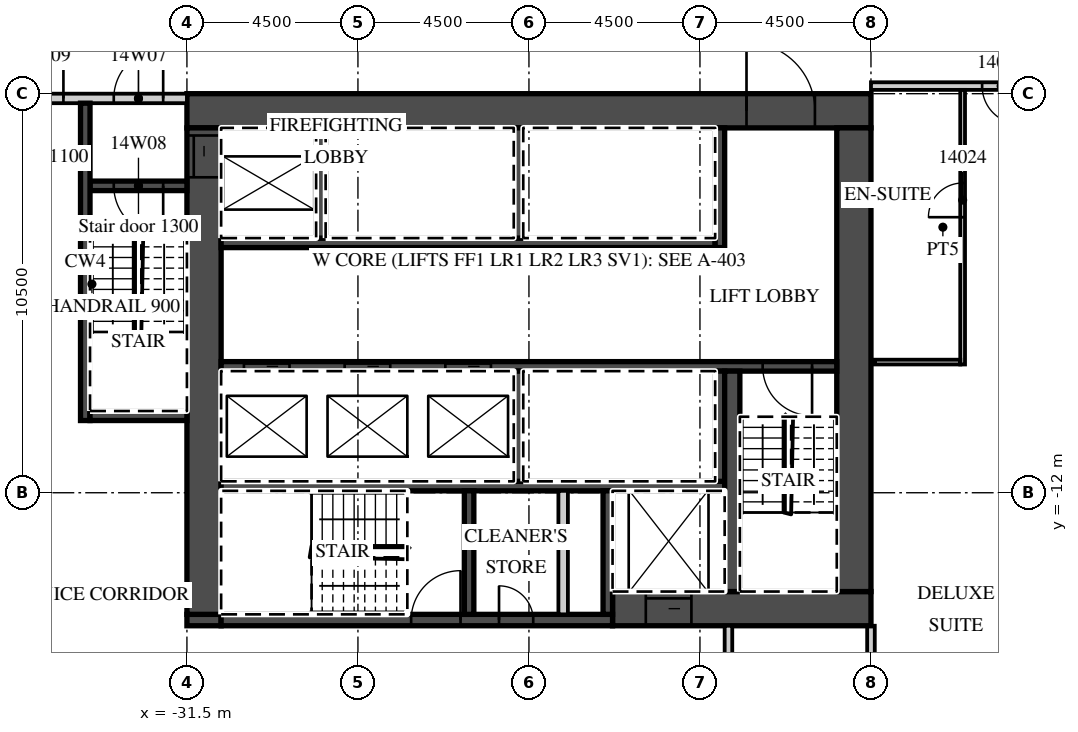
"""IFC4 building model, lengths in metres.
Left out: names, types, materials, properties, quantities, classifications, styles, units other than length and angle.
Written with IfcOpenShell. Run it as: python <this file> out.ifc"""

import sys

from ifc_helpers import new_model, si_unit, direction, frame, frame_2d, origin, place, context, subcontext, project, spatial, rectangle, extrude, element, fill, save


model = new_model("IFC4")
c1 = context("Model", 3, precision=1e-05, world=origin(), true_north=direction((0.0, 1.0)))
c2 = subcontext(c1, "Body", "Model", "MODEL_VIEW")
j1 = project(units=[si_unit("LENGTHUNIT", "METRE"), si_unit("PLANEANGLEUNIT", "RADIAN")], contexts=[c1])
p1 = place(None, origin())
s1 = spatial("IfcSite", under=j1, at=p1, CompositionType="ELEMENT")
p2 = place(p1, origin())
s2 = spatial("IfcBuilding", under=s1, at=p2, CompositionType="ELEMENT")
p3 = place(p2, frame((0.0, 0.0, 76.5)))
s3 = spatial("IfcBuildingStorey", under=s2, at=p3, CompositionType="ELEMENT", Elevation=76.5)
p4 = place(p3, frame((-13.5, -21.55, 0.0), z_axis=(0.0, 0.0, 1.0), x_axis=(0.0, 1.0, 0.0)))
e1 = element("IfcWall", 1, at=p4, inside=s3, PredefinedType="PARTITIONING", context=c2, shape_type="SweptSolid", body=[
    extrude(rectangle(XDim=6.05, YDim=0.2, at=frame_2d((3.025, 0.0))), origin(), (0.0, 0.0, 1.0), 3.02),
])
p5 = place(p3, frame((-13.5, -1.3, 0.0), z_axis=(0.0, 0.0, 1.0), x_axis=(1.0, 0.0, 0.0)))
e2 = element("IfcWall", 2, at=p5, inside=s3, PredefinedType="PARTITIONING", context=c2, shape_type="SweptSolid", body=[
    extrude(rectangle(XDim=58.05, YDim=0.2, at=frame_2d((29.025, 0.0))), origin(), (0.0, 0.0, 1.0), 3.02),
])
p6 = place(p5, frame((2.925, 0.0, 0.0)))
e3 = element("IfcOpeningElement", 3, at=p6, cuts=e2, PredefinedType="OPENING", context=c2, shape_type="SweptSolid", body=[
    extrude(rectangle(XDim=1.0, YDim=2.1, at=frame_2d((0.5, 1.05))), frame((0.0, 0.11, 0.0), z_axis=(0.0, -1.0, 0.0), x_axis=(1.0, 0.0, 0.0)), (0.0, 0.0, 1.0), 0.22),
])
p7 = place(p5, frame((5.075, 0.0, 0.0)))
e4 = element("IfcOpeningElement", 4, at=p7, cuts=e2, PredefinedType="OPENING", context=c2, shape_type="SweptSolid", body=[
    extrude(rectangle(XDim=1.0, YDim=2.1, at=frame_2d((0.5, 1.05))), frame((0.0, 0.11, 0.0), z_axis=(0.0, -1.0, 0.0), x_axis=(1.0, 0.0, 0.0)), (0.0, 0.0, 1.0), 0.22),
])
p8 = place(p5, frame((9.55, 0.0, 0.0)))
e5 = element("IfcOpeningElement", 5, at=p8, cuts=e2, PredefinedType="OPENING", context=c2, shape_type="SweptSolid", body=[
    extrude(rectangle(XDim=1.0, YDim=2.1, at=frame_2d((0.5, 1.05))), frame((0.0, 0.11, 0.0), z_axis=(0.0, -1.0, 0.0), x_axis=(1.0, 0.0, 0.0)), (0.0, 0.0, 1.0), 0.22),
])
p9 = place(p5, frame((18.862, 0.0, 0.0)))
e6 = element("IfcOpeningElement", 6, at=p9, cuts=e2, PredefinedType="OPENING", context=c2, shape_type="SweptSolid", body=[
    extrude(rectangle(XDim=1.2, YDim=2.1, at=frame_2d((0.6, 1.05))), frame((0.0, 0.11, 0.0), z_axis=(0.0, -1.0, 0.0), x_axis=(1.0, 0.0, 0.0)), (0.0, 0.0, 1.0), 0.22),
])
p10 = place(p5, frame((27.862, 0.0, 0.0)))
e7 = element("IfcOpeningElement", 7, at=p10, cuts=e2, PredefinedType="OPENING", context=c2, shape_type="SweptSolid", body=[
    extrude(rectangle(XDim=1.2, YDim=2.1, at=frame_2d((0.6, 1.05))), frame((0.0, 0.11, 0.0), z_axis=(0.0, -1.0, 0.0), x_axis=(1.0, 0.0, 0.0)), (0.0, 0.0, 1.0), 0.22),
])
p11 = place(p5, frame((34.45, 0.0, 0.0)))
e8 = element("IfcOpeningElement", 8, at=p11, cuts=e2, PredefinedType="OPENING", context=c2, shape_type="SweptSolid", body=[
    extrude(rectangle(XDim=1.0, YDim=2.1, at=frame_2d((0.5, 1.05))), frame((0.0, 0.11, 0.0), z_axis=(0.0, -1.0, 0.0), x_axis=(1.0, 0.0, 0.0)), (0.0, 0.0, 1.0), 0.22),
])
p12 = place(p5, frame((38.925, 0.0, 0.0)))
e9 = element("IfcOpeningElement", 9, at=p12, cuts=e2, PredefinedType="OPENING", context=c2, shape_type="SweptSolid", body=[
    extrude(rectangle(XDim=1.0, YDim=2.1, at=frame_2d((0.5, 1.05))), frame((0.0, 0.11, 0.0), z_axis=(0.0, -1.0, 0.0), x_axis=(1.0, 0.0, 0.0)), (0.0, 0.0, 1.0), 0.22),
])
p13 = place(p5, frame((45.862, 0.0, 0.0)))
e10 = element("IfcOpeningElement", 10, at=p13, cuts=e2, PredefinedType="OPENING", context=c2, shape_type="SweptSolid", body=[
    extrude(rectangle(XDim=1.2, YDim=2.1, at=frame_2d((0.6, 1.05))), frame((0.0, 0.11, 0.0), z_axis=(0.0, -1.0, 0.0), x_axis=(1.0, 0.0, 0.0)), (0.0, 0.0, 1.0), 0.22),
])
p14 = place(p5, frame((50.075, 0.0, 0.0)))
e11 = element("IfcOpeningElement", 11, at=p14, cuts=e2, PredefinedType="OPENING", context=c2, shape_type="SweptSolid", body=[
    extrude(rectangle(XDim=1.0, YDim=2.1, at=frame_2d((0.5, 1.05))), frame((0.0, 0.11, 0.0), z_axis=(0.0, -1.0, 0.0), x_axis=(1.0, 0.0, 0.0)), (0.0, 0.0, 1.0), 0.22),
])
p15 = place(p5, frame((56.525, 0.0, 0.0)))
e12 = element("IfcOpeningElement", 12, at=p15, cuts=e2, PredefinedType="OPENING", context=c2, shape_type="SweptSolid", body=[
    extrude(rectangle(XDim=1.0, YDim=2.1, at=frame_2d((0.5, 1.05))), frame((0.0, 0.11, 0.0), z_axis=(0.0, -1.0, 0.0), x_axis=(1.0, 0.0, 0.0)), (0.0, 0.0, 1.0), 0.22),
])
p16 = place(p3, frame((-11.088, -8.625, 0.0), z_axis=(0.0, 0.0, 1.0), x_axis=(0.0, 1.0, 0.0)))
e13 = element("IfcWall", 13, at=p16, inside=s3, PredefinedType="PARTITIONING", context=c2, shape_type="SweptSolid", body=[
    extrude(rectangle(XDim=7.225, YDim=0.125, at=frame_2d((3.613, 0.0))), origin(), (0.0, 0.0, 1.0), 3.02),
])
p17 = place(p16, frame((3.875, 0.0, 0.0)))
e14 = element("IfcOpeningElement", 14, at=p17, cuts=e13, PredefinedType="OPENING", context=c2, shape_type="SweptSolid", body=[
    extrude(rectangle(XDim=0.9, YDim=2.1, at=frame_2d((0.45, 1.05))), frame((0.0, 0.073, 0.0), z_axis=(0.0, -1.0, 0.0), x_axis=(1.0, 0.0, 0.0)), (0.0, 0.0, 1.0), 0.145),
])
p18 = place(p3, frame((-13.4, -8.562, 0.0), z_axis=(0.0, 0.0, 1.0), x_axis=(1.0, 0.0, 0.0)))
e15 = element("IfcWall", 15, at=p18, inside=s3, PredefinedType="PARTITIONING", context=c2, shape_type="SweptSolid", body=[
    extrude(rectangle(XDim=2.25, YDim=0.125, at=frame_2d((1.125, 0.0))), origin(), (0.0, 0.0, 1.0), 3.02),
])
p19 = place(p3, frame((-31.5, -1.95, 0.0), z_axis=(0.0, 0.0, 1.0), x_axis=(1.0, 0.0, 0.0)))
e16 = element("IfcWall", 16, at=p19, inside=s3, PredefinedType="SHEAR", context=c2, shape_type="SweptSolid", body=[
    extrude(rectangle(XDim=18.0, YDim=0.9, at=frame_2d((9.0, 0.0))), origin(), (0.0, 0.0, 1.0), 3.02),
])
p20 = place(p19, frame((14.725, 0.0, 0.0)))
e17 = element("IfcOpeningElement", 17, at=p20, cuts=e16, PredefinedType="OPENING", context=c2, shape_type="SweptSolid", body=[
    extrude(rectangle(XDim=1.8, YDim=2.1, at=frame_2d((0.9, 1.05))), frame((0.0, 0.46, 0.0), z_axis=(0.0, -1.0, 0.0), x_axis=(1.0, 0.0, 0.0)), (0.0, 0.0, 1.0), 0.92),
])
p21 = place(p3, frame((-20.3, -15.05, 0.0), z_axis=(0.0, 0.0, 1.0), x_axis=(1.0, 0.0, 0.0)))
e18 = element("IfcWall", 18, at=p21, inside=s3, PredefinedType="SHEAR", context=c2, shape_type="SweptSolid", body=[
    extrude(rectangle(XDim=6.8, YDim=0.9, at=frame_2d((3.4, 0.0))), origin(), (0.0, 0.0, 1.0), 3.02),
])
p22 = place(p21, frame((0.875, 0.0, 0.0)))
e19 = element("IfcOpeningElement", 19, at=p22, cuts=e18, PredefinedType="OPENING", context=c2, shape_type="SweptSolid", body=[
    extrude(rectangle(XDim=1.2, YDim=2.1, at=frame_2d((0.6, 1.05))), frame((0.0, 0.46, 0.0), z_axis=(0.0, -1.0, 0.0), x_axis=(1.0, 0.0, 0.0)), (0.0, 0.0, 1.0), 0.92),
])
p23 = place(p3, frame((-31.5, -15.35, 0.0), z_axis=(0.0, 0.0, 1.0), x_axis=(1.0, 0.0, 0.0)))
e20 = element("IfcWall", 20, at=p23, inside=s3, PredefinedType="SHEAR", context=c2, shape_type="SweptSolid", body=[
    extrude(rectangle(XDim=0.9, YDim=0.3, at=frame_2d((0.45, 0.0))), origin(), (0.0, 0.0, 1.0), 3.02),
])
p24 = place(p3, frame((-30.6, -15.35, 0.0), z_axis=(0.0, 0.0, 1.0), x_axis=(1.0, 0.0, 0.0)))
e21 = element("IfcWall", 21, at=p24, inside=s3, PredefinedType="SHEAR", context=c2, shape_type="SweptSolid", body=[
    extrude(rectangle(XDim=10.3, YDim=0.3, at=frame_2d((5.15, 0.0))), origin(), (0.0, 0.0, 1.0), 3.02),
])
p25 = place(p24, frame((5.0, 0.0, 0.0)))
e22 = element("IfcOpeningElement", 22, at=p25, cuts=e21, PredefinedType="OPENING", context=c2, shape_type="SweptSolid", body=[
    extrude(rectangle(XDim=1.3, YDim=2.1, at=frame_2d((0.65, 1.05))), frame((0.0, 0.16, 0.0), z_axis=(0.0, -1.0, 0.0), x_axis=(1.0, 0.0, 0.0)), (0.0, 0.0, 1.0), 0.32),
])
p26 = place(p24, frame((7.312, 0.0, 0.0)))
e23 = element("IfcOpeningElement", 23, at=p26, cuts=e21, PredefinedType="OPENING", context=c2, shape_type="SweptSolid", body=[
    extrude(rectangle(XDim=0.9, YDim=2.1, at=frame_2d((0.45, 1.05))), frame((0.0, 0.16, 0.0), z_axis=(0.0, -1.0, 0.0), x_axis=(1.0, 0.0, 0.0)), (0.0, 0.0, 1.0), 0.32),
])
p27 = place(p3, frame((-31.05, -15.2, 0.0), z_axis=(0.0, 0.0, 1.0), x_axis=(0.0, 1.0, 0.0)))
e24 = element("IfcWall", 24, at=p27, inside=s3, PredefinedType="SHEAR", context=c2, shape_type="SweptSolid", body=[
    extrude(rectangle(XDim=12.8, YDim=0.9, at=frame_2d((6.4, 0.0))), origin(), (0.0, 0.0, 1.0), 3.02),
])
p28 = place(p27, frame((11.5, 0.0, 0.0)))
e25 = element("IfcOpeningElement", 25, at=p28, cuts=e24, PredefinedType="OPENING", context=c2, shape_type="SweptSolid", body=[
    extrude(rectangle(XDim=1.1, YDim=2.1, at=frame_2d((0.55, 1.05))), frame((0.0, 0.46, 0.0), z_axis=(0.0, -1.0, 0.0), x_axis=(1.0, 0.0, 0.0)), (0.0, 0.0, 1.0), 0.92),
])
p29 = place(p3, frame((-13.95, -14.6, 0.0), z_axis=(0.0, 0.0, 1.0), x_axis=(0.0, 1.0, 0.0)))
e26 = element("IfcWall", 26, at=p29, inside=s3, PredefinedType="SHEAR", context=c2, shape_type="SweptSolid", body=[
    extrude(rectangle(XDim=12.2, YDim=0.9, at=frame_2d((6.1, 0.0))), origin(), (0.0, 0.0, 1.0), 3.02),
])
p30 = place(p3, frame((-30.6, -5.425, 0.0), z_axis=(0.0, 0.0, 1.0), x_axis=(1.0, 0.0, 0.0)))
e27 = element("IfcWall", 27, at=p30, inside=s3, PredefinedType="SHEAR", context=c2, shape_type="SweptSolid", body=[
    extrude(rectangle(XDim=13.0, YDim=0.25, at=frame_2d((6.5, 0.0))), origin(), (0.0, 0.0, 1.0), 3.02),
])
p31 = place(p3, frame((-17.475, -5.55, 0.0), z_axis=(0.0, 0.0, 1.0), x_axis=(0.0, 1.0, 0.0)))
e28 = element("IfcWall", 28, at=p31, inside=s3, PredefinedType="SHEAR", context=c2, shape_type="SweptSolid", body=[
    extrude(rectangle(XDim=3.15, YDim=0.25, at=frame_2d((1.575, 0.0))), origin(), (0.0, 0.0, 1.0), 3.02),
])
for number, where, z_axis, x_axis in (
    (29, (-27.975, -5.3, 0.0), (0.0, 0.0, 1.0), (0.0, 1.0, 0.0)),
    (30, (-22.775, -5.3, 0.0), (0.0, 0.0, 1.0), (0.0, 1.0, 0.0)),
):
    element("IfcWall", number, at=place(p3, frame(where, z_axis=z_axis, x_axis=x_axis)), inside=s3, PredefinedType="SHEAR", context=c2, shape_type="SweptSolid", body=[
        extrude(rectangle(XDim=2.9, YDim=0.25, at=frame_2d((1.45, 0.0))), origin(), (0.0, 0.0, 1.0), 3.02),
    ])
p32 = place(p3, frame((-30.6, -8.675, 0.0), z_axis=(0.0, 0.0, 1.0), x_axis=(1.0, 0.0, 0.0)))
e31 = element("IfcWall", 31, at=p32, inside=s3, PredefinedType="SHEAR", context=c2, shape_type="SweptSolid", body=[
    extrude(rectangle(XDim=16.2, YDim=0.25, at=frame_2d((8.1, 0.0))), origin(), (0.0, 0.0, 1.0), 3.02),
])
p33 = place(p32, frame((0.6, 0.0, 0.0)))
e32 = element("IfcOpeningElement", 32, at=p33, cuts=e31, PredefinedType="OPENING", context=c2, shape_type="SweptSolid", body=[
    extrude(rectangle(XDim=1.2, YDim=2.1, at=frame_2d((0.6, 1.05))), frame((0.0, 0.135, 0.0), z_axis=(0.0, -1.0, 0.0), x_axis=(1.0, 0.0, 0.0)), (0.0, 0.0, 1.0), 0.27),
])
p34 = place(p32, frame((3.25, 0.0, 0.0)))
e33 = element("IfcOpeningElement", 33, at=p34, cuts=e31, PredefinedType="OPENING", context=c2, shape_type="SweptSolid", body=[
    extrude(rectangle(XDim=1.2, YDim=2.1, at=frame_2d((0.6, 1.05))), frame((0.0, 0.135, 0.0), z_axis=(0.0, -1.0, 0.0), x_axis=(1.0, 0.0, 0.0)), (0.0, 0.0, 1.0), 0.27),
])
p35 = place(p32, frame((5.9, 0.0, 0.0)))
e34 = element("IfcOpeningElement", 34, at=p35, cuts=e31, PredefinedType="OPENING", context=c2, shape_type="SweptSolid", body=[
    extrude(rectangle(XDim=1.2, YDim=2.1, at=frame_2d((0.6, 1.05))), frame((0.0, 0.135, 0.0), z_axis=(0.0, -1.0, 0.0), x_axis=(1.0, 0.0, 0.0)), (0.0, 0.0, 1.0), 0.27),
])
p36 = place(p32, frame((14.25, 0.0, 0.0)))
e35 = element("IfcOpeningElement", 35, at=p36, cuts=e31, PredefinedType="OPENING", context=c2, shape_type="SweptSolid", body=[
    extrude(rectangle(XDim=1.3, YDim=2.1, at=frame_2d((0.65, 1.05))), frame((0.0, 0.135, 0.0), z_axis=(0.0, -1.0, 0.0), x_axis=(1.0, 0.0, 0.0)), (0.0, 0.0, 1.0), 0.27),
])
p37 = place(p3, frame((-30.6, -11.825, 0.0), z_axis=(0.0, 0.0, 1.0), x_axis=(1.0, 0.0, 0.0)))
e36 = element("IfcWall", 36, at=p37, inside=s3, PredefinedType="SHEAR", context=c2, shape_type="SweptSolid", body=[
    extrude(rectangle(XDim=13.25, YDim=0.25, at=frame_2d((6.625, 0.0))), origin(), (0.0, 0.0, 1.0), 3.02),
])
for number, where, z_axis, x_axis in (
    (37, (-17.475, -11.7, 0.0), (0.0, 0.0, 1.0), (0.0, 1.0, 0.0)),
    (38, (-22.775, -11.7, 0.0), (0.0, 0.0, 1.0), (0.0, 1.0, 0.0)),
):
    element("IfcWall", number, at=place(p3, frame(where, z_axis=z_axis, x_axis=x_axis)), inside=s3, PredefinedType="SHEAR", context=c2, shape_type="SweptSolid", body=[
        extrude(rectangle(XDim=2.9, YDim=0.25, at=frame_2d((1.45, 0.0))), origin(), (0.0, 0.0, 1.0), 3.02),
    ])
p38 = place(p3, frame((-17.15, -14.6, 0.0), z_axis=(0.0, 0.0, 1.0), x_axis=(0.0, 1.0, 0.0)))
e39 = element("IfcWall", 39, at=p38, inside=s3, PredefinedType="SHEAR", context=c2, shape_type="SweptSolid", body=[
    extrude(rectangle(XDim=5.8, YDim=0.4, at=frame_2d((2.9, 0.0))), origin(), (0.0, 0.0, 1.0), 3.02),
])
for number, where, z_axis, x_axis in (
    (40, (-20.425, -15.2, 0.0), (0.0, 0.0, 1.0), (0.0, 1.0, 0.0)),
    (41, (-24.075, -15.2, 0.0), (0.0, 0.0, 1.0), (0.0, 1.0, 0.0)),
):
    element("IfcWall", number, at=place(p3, frame(where, z_axis=z_axis, x_axis=x_axis)), inside=s3, PredefinedType="SHEAR", context=c2, shape_type="SweptSolid", body=[
        extrude(rectangle(XDim=3.25, YDim=0.25, at=frame_2d((1.625, 0.0))), origin(), (0.0, 0.0, 1.0), 3.02),
    ])
p39 = place(p3, frame((-21.6, -15.2, 0.0), z_axis=(0.0, 0.0, 1.0), x_axis=(0.0, 1.0, 0.0)))
e42 = element("IfcWall", 42, at=p39, inside=s3, PredefinedType="PARTITIONING", context=c2, shape_type="SweptSolid", body=[
    extrude(rectangle(XDim=3.25, YDim=0.25, at=frame_2d((1.625, 0.0))), origin(), (0.0, 0.0, 1.0), 3.02),
])
p40 = place(p3, frame((-44.55, -1.625, 0.0), z_axis=(0.0, 0.0, 1.0), x_axis=(1.0, 0.0, 0.0)))
e43 = element("IfcWall", 43, at=p40, inside=s3, PredefinedType="PARTITIONING", context=c2, shape_type="SweptSolid", body=[
    extrude(rectangle(XDim=13.05, YDim=0.25, at=frame_2d((6.525, 0.0))), origin(), (0.0, 0.0, 1.0), 3.02),
])
p41 = place(p40, frame((11.125, 0.0, 0.0)))
e44 = element("IfcOpeningElement", 44, at=p41, cuts=e43, PredefinedType="OPENING", context=c2, shape_type="SweptSolid", body=[
    extrude(rectangle(XDim=1.3, YDim=2.1, at=frame_2d((0.65, 1.05))), frame((0.0, 0.135, 0.0), z_axis=(0.0, -1.0, 0.0), x_axis=(1.0, 0.0, 0.0)), (0.0, 0.0, 1.0), 0.27),
])
p42 = place(p40, frame((8.7, 0.0, 0.0)))
e45 = element("IfcOpeningElement", 45, at=p42, cuts=e43, PredefinedType="OPENING", context=c2, shape_type="SweptSolid", body=[
    extrude(rectangle(XDim=1.1, YDim=2.1, at=frame_2d((0.55, 1.05))), frame((0.0, 0.135, 0.0), z_axis=(0.0, -1.0, 0.0), x_axis=(1.0, 0.0, 0.0)), (0.0, 0.0, 1.0), 0.27),
])
p43 = place(p3, frame((-34.05, -3.925, 0.0), z_axis=(0.0, 0.0, 1.0), x_axis=(1.0, 0.0, 0.0)))
e46 = element("IfcWall", 46, at=p43, inside=s3, PredefinedType="SHEAR", context=c2, shape_type="SweptSolid", body=[
    extrude(rectangle(XDim=2.55, YDim=0.25, at=frame_2d((1.275, 0.0))), origin(), (0.0, 0.0, 1.0), 3.02),
])
p44 = place(p43, frame((0.625, 0.0, 0.0)))
e47 = element("IfcOpeningElement", 47, at=p44, cuts=e46, PredefinedType="OPENING", context=c2, shape_type="SweptSolid", body=[
    extrude(rectangle(XDim=1.3, YDim=2.1, at=frame_2d((0.65, 1.05))), frame((0.0, 0.135, 0.0), z_axis=(0.0, -1.0, 0.0), x_axis=(1.0, 0.0, 0.0)), (0.0, 0.0, 1.0), 0.27),
])
p45 = place(p3, frame((-34.175, -10.1, 0.0), z_axis=(0.0, 0.0, 1.0), x_axis=(0.0, 1.0, 0.0)))
e48 = element("IfcWall", 48, at=p45, inside=s3, PredefinedType="SHEAR", context=c2, shape_type="SweptSolid", body=[
    extrude(rectangle(XDim=8.35, YDim=0.25, at=frame_2d((4.175, 0.0))), origin(), (0.0, 0.0, 1.0), 3.02),
])
p46 = place(p3, frame((-34.05, -9.975, 0.0), z_axis=(0.0, 0.0, 1.0), x_axis=(1.0, 0.0, 0.0)))
e49 = element("IfcWall", 49, at=p46, inside=s3, PredefinedType="SHEAR", context=c2, shape_type="SweptSolid", body=[
    extrude(rectangle(XDim=2.55, YDim=0.25, at=frame_2d((1.275, 0.0))), origin(), (0.0, 0.0, 1.0), 3.02),
])
p47 = place(p3, frame((-17.25, -17.7, 0.0), z_axis=(0.0, 0.0, 1.0), x_axis=(0.0, 1.0, 0.0)))
e50 = element("IfcWall", 50, at=p47, inside=s3, PredefinedType="PARTITIONING", context=c2, shape_type="SweptSolid", body=[
    extrude(rectangle(XDim=2.2, YDim=0.2, at=frame_2d((1.1, 0.0))), origin(), (0.0, 0.0, 1.0), 3.02),
])
p48 = place(p6, origin())
e51 = element("IfcDoor", 51, at=p48, inside=s3, OperationType="SINGLE_SWING_RIGHT", PredefinedType="DOOR", context=c2, shape_type="SweptSolid", body=[
    extrude(rectangle(XDim=1.0, YDim=2.1, at=frame_2d((0.5, 1.05))), frame((0.0, 0.025, 0.0), z_axis=(0.0, -1.0, 0.0), x_axis=(1.0, 0.0, 0.0)), (0.0, 0.0, 1.0), 0.05),
])
fill(e3, e51)
p49 = place(p17, origin())
e52 = element("IfcDoor", 52, at=p49, inside=s3, OperationType="SINGLE_SWING_LEFT", PredefinedType="DOOR", context=c2, shape_type="SweptSolid", body=[
    extrude(rectangle(XDim=0.9, YDim=2.1, at=frame_2d((0.45, 1.05))), frame((0.0, 0.025, 0.0), z_axis=(0.0, -1.0, 0.0), x_axis=(1.0, 0.0, 0.0)), (0.0, 0.0, 1.0), 0.05),
])
fill(e14, e52)
p50 = place(p33, origin())
e53 = element("IfcDoor", 53, at=p50, inside=s3, OperationType="SLIDING_TO_LEFT", PredefinedType="DOOR", context=c2, shape_type="SweptSolid", body=[
    extrude(rectangle(XDim=1.2, YDim=2.1, at=frame_2d((0.6, 1.05))), frame((0.0, 0.025, 0.0), z_axis=(0.0, -1.0, 0.0), x_axis=(1.0, 0.0, 0.0)), (0.0, 0.0, 1.0), 0.05),
])
fill(e32, e53)
p51 = place(p34, origin())
e54 = element("IfcDoor", 54, at=p51, inside=s3, OperationType="SLIDING_TO_RIGHT", PredefinedType="DOOR", context=c2, shape_type="SweptSolid", body=[
    extrude(rectangle(XDim=1.2, YDim=2.1, at=frame_2d((0.6, 1.05))), frame((0.0, 0.025, 0.0), z_axis=(0.0, -1.0, 0.0), x_axis=(1.0, 0.0, 0.0)), (0.0, 0.0, 1.0), 0.05),
])
fill(e33, e54)
p52 = place(p35, origin())
e55 = element("IfcDoor", 55, at=p52, inside=s3, OperationType="SLIDING_TO_RIGHT", PredefinedType="DOOR", context=c2, shape_type="SweptSolid", body=[
    extrude(rectangle(XDim=1.2, YDim=2.1, at=frame_2d((0.6, 1.05))), frame((0.0, 0.025, 0.0), z_axis=(0.0, -1.0, 0.0), x_axis=(1.0, 0.0, 0.0)), (0.0, 0.0, 1.0), 0.05),
])
fill(e34, e55)
p53 = place(p22, origin())
e56 = element("IfcDoor", 56, at=p53, inside=s3, OperationType="SLIDING_TO_LEFT", PredefinedType="DOOR", context=c2, shape_type="SweptSolid", body=[
    extrude(rectangle(XDim=1.2, YDim=2.1, at=frame_2d((0.6, 1.05))), frame((0.0, 0.025, 0.0), z_axis=(0.0, -1.0, 0.0), x_axis=(1.0, 0.0, 0.0)), (0.0, 0.0, 1.0), 0.05),
])
fill(e19, e56)
p54 = place(p28, origin())
e57 = element("IfcDoor", 57, at=p54, inside=s3, OperationType="SLIDING_TO_RIGHT", PredefinedType="DOOR", context=c2, shape_type="SweptSolid", body=[
    extrude(rectangle(XDim=1.1, YDim=2.1, at=frame_2d((0.55, 1.05))), frame((0.0, 0.025, 0.0), z_axis=(0.0, -1.0, 0.0), x_axis=(1.0, 0.0, 0.0)), (0.0, 0.0, 1.0), 0.05),
])
fill(e25, e57)
p55 = place(p20, origin())
e58 = element("IfcDoor", 58, at=p55, inside=s3, OperationType="DOUBLE_DOOR_DOUBLE_SWING", PredefinedType="DOOR", context=c2, shape_type="SweptSolid", body=[
    extrude(rectangle(XDim=1.8, YDim=2.1, at=frame_2d((0.9, 1.05))), frame((0.0, 0.025, 0.0), z_axis=(0.0, -1.0, 0.0), x_axis=(1.0, 0.0, 0.0)), (0.0, 0.0, 1.0), 0.05),
])
fill(e17, e58)
p56 = place(p41, origin())
e59 = element("IfcDoor", 59, at=p56, inside=s3, OperationType="SINGLE_SWING_RIGHT", PredefinedType="DOOR", context=c2, shape_type="SweptSolid", body=[
    extrude(rectangle(XDim=1.3, YDim=2.1, at=frame_2d((0.65, 1.05))), frame((0.0, 0.025, 0.0), z_axis=(0.0, -1.0, 0.0), x_axis=(1.0, 0.0, 0.0)), (0.0, 0.0, 1.0), 0.05),
])
fill(e44, e59)
p57 = place(p44, origin())
e60 = element("IfcDoor", 60, at=p57, inside=s3, OperationType="SINGLE_SWING_RIGHT", PredefinedType="DOOR", context=c2, shape_type="SweptSolid", body=[
    extrude(rectangle(XDim=1.3, YDim=2.1, at=frame_2d((0.65, 1.05))), frame((0.0, 0.025, 0.0), z_axis=(0.0, -1.0, 0.0), x_axis=(1.0, 0.0, 0.0)), (0.0, 0.0, 1.0), 0.05),
])
fill(e47, e60)
p58 = place(p42, origin())
e61 = element("IfcDoor", 61, at=p58, inside=s3, OperationType="SINGLE_SWING_RIGHT", PredefinedType="DOOR", context=c2, shape_type="SweptSolid", body=[
    extrude(rectangle(XDim=1.1, YDim=2.1, at=frame_2d((0.55, 1.05))), frame((0.0, 0.025, 0.0), z_axis=(0.0, -1.0, 0.0), x_axis=(1.0, 0.0, 0.0)), (0.0, 0.0, 1.0), 0.05),
])
fill(e45, e61)
p59 = place(p36, origin())
e62 = element("IfcDoor", 62, at=p59, inside=s3, OperationType="SINGLE_SWING_RIGHT", PredefinedType="DOOR", context=c2, shape_type="SweptSolid", body=[
    extrude(rectangle(XDim=1.3, YDim=2.1, at=frame_2d((0.65, 1.05))), frame((0.0, 0.025, 0.0), z_axis=(0.0, -1.0, 0.0), x_axis=(1.0, 0.0, 0.0)), (0.0, 0.0, 1.0), 0.05),
])
fill(e35, e62)
p60 = place(p25, origin())
e63 = element("IfcDoor", 63, at=p60, inside=s3, OperationType="SINGLE_SWING_RIGHT", PredefinedType="DOOR", context=c2, shape_type="SweptSolid", body=[
    extrude(rectangle(XDim=1.3, YDim=2.1, at=frame_2d((0.65, 1.05))), frame((0.0, 0.025, 0.0), z_axis=(0.0, -1.0, 0.0), x_axis=(1.0, 0.0, 0.0)), (0.0, 0.0, 1.0), 0.05),
])
fill(e22, e63)
p61 = place(p26, origin())
e64 = element("IfcDoor", 64, at=p61, inside=s3, OperationType="SINGLE_SWING_LEFT", PredefinedType="DOOR", context=c2, shape_type="SweptSolid", body=[
    extrude(rectangle(XDim=0.9, YDim=2.1, at=frame_2d((0.45, 1.05))), frame((0.0, 0.025, 0.0), z_axis=(0.0, -1.0, 0.0), x_axis=(1.0, 0.0, 0.0)), (0.0, 0.0, 1.0), 0.05),
])
fill(e23, e64)
save(model, sys.argv[1])
